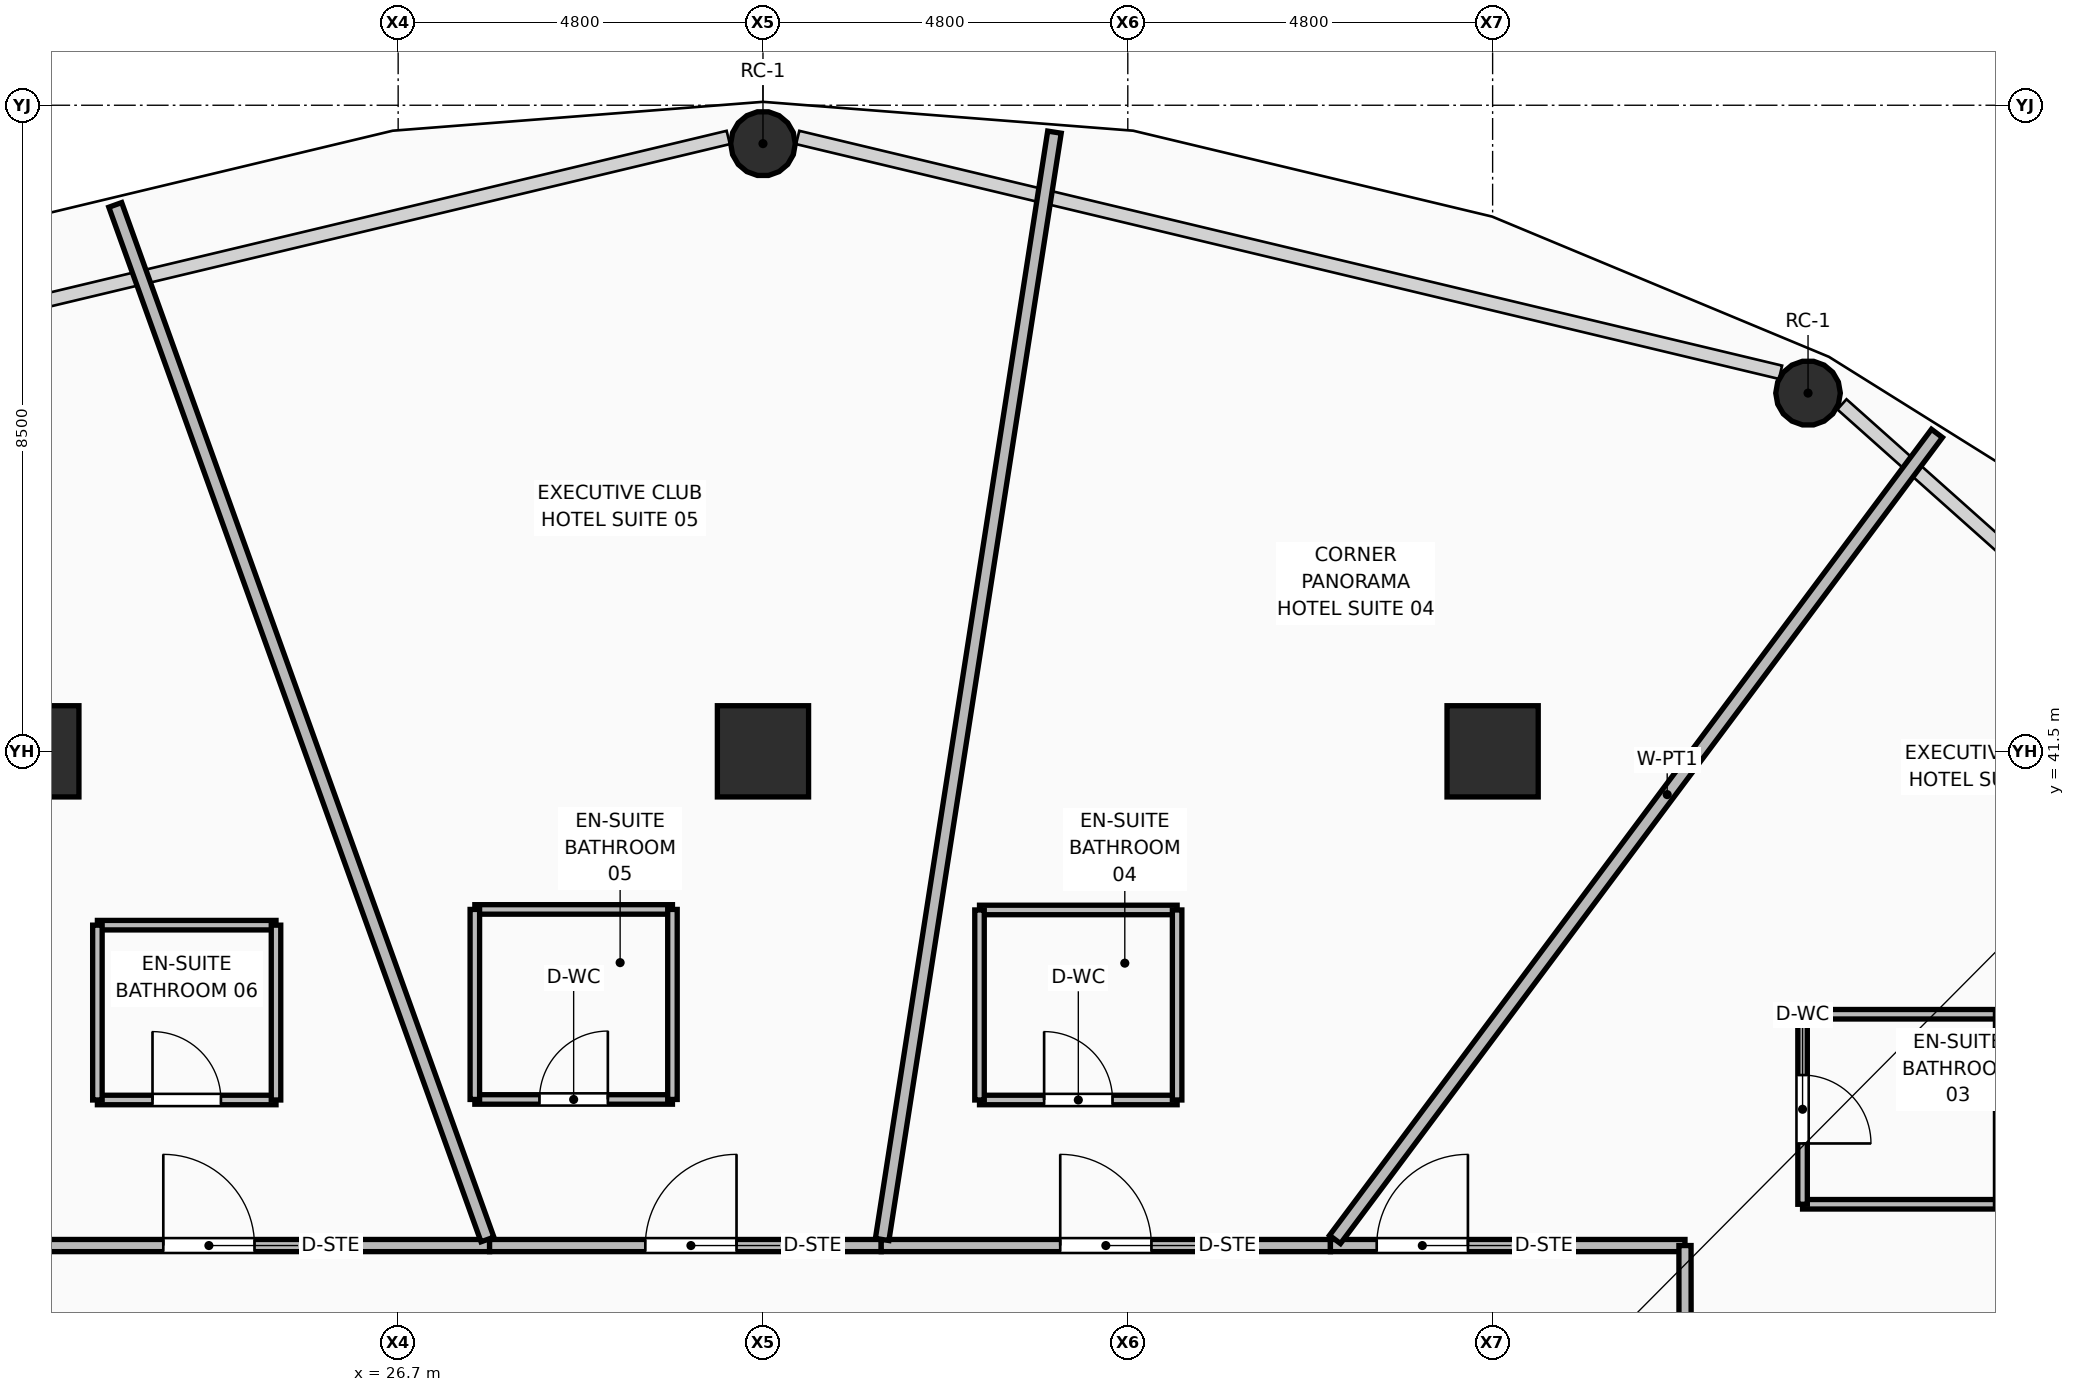
"""IFC4 building model, lengths in metres.
Left out: names, types, materials, properties, quantities, classifications, styles, units other than length and angle.
Written with IfcOpenShell. Run it as: python <this file> out.ifc"""

import sys

from ifc_helpers import new_model, si_unit, direction, frame, frame_2d, origin, origin_2d, place, context, subcontext, project, spatial, rectangle, hollow_rectangle, hollow_circle, extrude, element, fill, save


model = new_model("IFC4")
c1 = context("Model", 3, precision=1e-05, world=origin(), true_north=direction((0.0, 1.0)))
c2 = subcontext(c1, "Body", "Model", "MODEL_VIEW")
j1 = project(units=[si_unit("LENGTHUNIT", "METRE"), si_unit("PLANEANGLEUNIT", "RADIAN")], contexts=[c1])
p1 = place(None, origin())
s1 = spatial("IfcSite", under=j1, at=p1, CompositionType="ELEMENT")
p2 = place(p1, origin())
s2 = spatial("IfcBuilding", under=s1, at=p2, CompositionType="ELEMENT")
p3 = place(p2, frame((0.0, 0.0, 83.25)))
s3 = spatial("IfcBuildingStorey", under=s2, at=p3, CompositionType="ELEMENT", Elevation=83.25)
for number, where, z_axis, x_axis in (
    (1, (21.9, 41.5, 0.0), (0.0, 0.0, 1.0), (1.0, 0.0, 0.0)),
    (2, (31.5, 41.5, 0.0), (0.0, 0.0, 1.0), (1.0, 0.0, 0.0)),
    (3, (41.1, 41.5, 0.0), (0.0, 0.0, 1.0), (1.0, 0.0, 0.0)),
):
    element("IfcColumn", number, at=place(p3, frame(where, z_axis=z_axis, x_axis=x_axis)), inside=s3, PredefinedType="COLUMN", context=c2, shape_type="SweptSolid", body=[
        extrude(hollow_rectangle(XDim=1.2, YDim=1.2, WallThickness=0.045, at=origin_2d()), origin(), (0.0, 0.0, 1.0), 3.75),
    ])
for number, where, z_axis, x_axis in (
    (4, (45.25, 46.213, 0.0), (0.0, 0.0, 1.0), (1.0, 0.0, 0.0)),
    (5, (31.5, 49.495, 0.0), (0.0, 0.0, 1.0), (1.0, 0.0, 0.0)),
):
    element("IfcColumn", number, at=place(p3, frame(where, z_axis=z_axis, x_axis=x_axis)), inside=s3, PredefinedType="COLUMN", context=c2, shape_type="SweptSolid", body=[
        extrude(hollow_circle(Radius=0.425, WallThickness=0.04, at=origin_2d()), origin(), (0.0, 0.0, 1.0), 3.57),
    ])
p4 = place(p3, frame((20.811, 34.998, 0.0), z_axis=(0.0, 0.0, 1.0), x_axis=(1.0, 0.0, 0.0)))
e6 = element("IfcWall", 6, at=p4, inside=s3, PredefinedType="PARTITIONING", context=c2, shape_type="SweptSolid", body=[
    extrude(rectangle(XDim=7.092, YDim=0.16, at=frame_2d((3.546, 0.0))), origin(), (0.0, 0.0, 1.0), 2.928),
])
p5 = place(p4, frame((2.799, 0.0, 0.0)))
e7 = element("IfcOpeningElement", 7, at=p5, cuts=e6, PredefinedType="OPENING", context=c2, shape_type="SweptSolid", body=[
    extrude(rectangle(XDim=1.2, YDim=2.1, at=frame_2d((0.6, 1.05))), frame((0.0, 0.09, 0.0), z_axis=(0.0, -1.0, 0.0), x_axis=(1.0, 0.0, 0.0)), (0.0, 0.0, 1.0), 0.18),
])
p6 = place(p3, frame((27.903, 34.998, 0.0), z_axis=(0.0, 0.0, 1.0), x_axis=(1.0, 0.0, 0.0)))
e8 = element("IfcWall", 8, at=p6, inside=s3, PredefinedType="PARTITIONING", context=c2, shape_type="SweptSolid", body=[
    extrude(rectangle(XDim=5.153, YDim=0.16, at=frame_2d((2.576, 0.0))), origin(), (0.0, 0.0, 1.0), 2.928),
])
p7 = place(p6, frame((2.049, 0.0, 0.0)))
e9 = element("IfcOpeningElement", 9, at=p7, cuts=e8, PredefinedType="OPENING", context=c2, shape_type="SweptSolid", body=[
    extrude(rectangle(XDim=1.2, YDim=2.1, at=frame_2d((0.6, 1.05))), frame((0.0, 0.09, 0.0), z_axis=(0.0, -1.0, 0.0), x_axis=(1.0, 0.0, 0.0)), (0.0, 0.0, 1.0), 0.18),
])
p8 = place(p3, frame((33.056, 34.998, 0.0), z_axis=(0.0, 0.0, 1.0), x_axis=(1.0, 0.0, 0.0)))
e10 = element("IfcWall", 10, at=p8, inside=s3, PredefinedType="PARTITIONING", context=c2, shape_type="SweptSolid", body=[
    extrude(rectangle(XDim=5.91, YDim=0.16, at=frame_2d((2.955, 0.0))), origin(), (0.0, 0.0, 1.0), 3.55),
])
p9 = place(p8, frame((2.355, 0.0, 0.0)))
e11 = element("IfcOpeningElement", 11, at=p9, cuts=e10, PredefinedType="OPENING", context=c2, shape_type="SweptSolid", body=[
    extrude(rectangle(XDim=1.2, YDim=2.1, at=frame_2d((0.6, 1.05))), frame((0.0, 0.09, 0.0), z_axis=(0.0, -1.0, 0.0), x_axis=(1.0, 0.0, 0.0)), (0.0, 0.0, 1.0), 0.18),
])
p10 = place(p3, frame((38.966, 34.998, 0.0), z_axis=(0.0, 0.0, 1.0), x_axis=(1.0, 0.0, 0.0)))
e12 = element("IfcWall", 12, at=p10, inside=s3, PredefinedType="PARTITIONING", context=c2, shape_type="SweptSolid", body=[
    extrude(rectangle(XDim=4.665, YDim=0.16, at=frame_2d((2.333, 0.0))), origin(), (0.0, 0.0, 1.0), 2.928),
])
p11 = place(p10, frame((0.609, 0.0, 0.0)))
e13 = element("IfcOpeningElement", 13, at=p11, cuts=e12, PredefinedType="OPENING", context=c2, shape_type="SweptSolid", body=[
    extrude(rectangle(XDim=1.2, YDim=2.1, at=frame_2d((0.6, 1.05))), frame((0.0, 0.09, 0.0), z_axis=(0.0, -1.0, 0.0), x_axis=(1.0, 0.0, 0.0)), (0.0, 0.0, 1.0), 0.18),
])
p12 = place(p3, frame((43.631, 34.998, 0.0), z_axis=(0.0, 0.0, 1.0), x_axis=(0.000858368782, -0.999999631601, 0.0)))
e14 = element("IfcWall", 14, at=p12, inside=s3, PredefinedType="PARTITIONING", context=c2, shape_type="SweptSolid", body=[
    extrude(rectangle(XDim=3.413, YDim=0.16, at=frame_2d((1.707, 0.0))), origin(), (0.0, 0.0, 1.0), 2.928),
])
p13 = place(p3, frame((43.728, 31.636, 0.0), z_axis=(0.0, 0.0, 1.0), x_axis=(0.878890179317, 0.477024163643, 0.0)))
e15 = element("IfcWall", 15, at=p13, inside=s3, PredefinedType="PARTITIONING", context=c2, shape_type="SweptSolid", body=[
    extrude(rectangle(XDim=13.211, YDim=0.18, at=frame_2d((6.605, 0.0))), origin(), (0.0, 0.0, 1.0), 2.775),
])
p14 = place(p3, frame((39.026, 35.078, 0.0), z_axis=(0.0, 0.0, 1.0), x_axis=(0.598366758348, 0.801222330258, 0.0)))
e16 = element("IfcWall", 16, at=p14, inside=s3, PredefinedType="PARTITIONING", context=c2, shape_type="SweptSolid", body=[
    extrude(rectangle(XDim=13.236, YDim=0.18, at=frame_2d((6.618, 0.0))), origin(), (0.0, 0.0, 1.0), 2.775),
])
p15 = place(p3, frame((33.068, 35.078, 0.0), z_axis=(0.0, 0.0, 1.0), x_axis=(0.153752995268, 0.988109314016, 0.0)))
e17 = element("IfcWall", 17, at=p15, inside=s3, PredefinedType="PARTITIONING", context=c2, shape_type="SweptSolid", body=[
    extrude(rectangle(XDim=14.743, YDim=0.18, at=frame_2d((7.372, 0.0))), origin(), (0.0, 0.0, 1.0), 2.775),
])
p16 = place(p3, frame((27.875, 35.078, 0.0), z_axis=(0.0, 0.0, 1.0), x_axis=(-0.338534786173, 0.940953876952, 0.0)))
e18 = element("IfcWall", 18, at=p16, inside=s3, PredefinedType="PARTITIONING", context=c2, shape_type="SweptSolid", body=[
    extrude(rectangle(XDim=14.465, YDim=0.18, at=frame_2d((7.232, 0.0))), origin(), (0.0, 0.0, 1.0), 2.775),
])
for number, where, z_axis, x_axis in (
    (19, (45.178, 35.541, 0.0), (0.0, 0.0, 1.0), (1.0, 0.0, 0.0)),
    (20, (45.178, 38.041, 0.0), (0.0, 0.0, 1.0), (1.0, 0.0, 0.0)),
):
    element("IfcWall", number, at=place(p3, frame(where, z_axis=z_axis, x_axis=x_axis)), inside=s3, PredefinedType="PARTITIONING", context=c2, shape_type="SweptSolid", body=[
        extrude(rectangle(XDim=2.6, YDim=0.125, at=frame_2d((1.3, 0.0))), origin(), (0.0, 0.0, 1.0), 3.55),
    ])
p17 = place(p3, frame((45.178, 35.541, 0.0), z_axis=(0.0, 0.0, 1.0), x_axis=(0.0, 1.0, 0.0)))
e21 = element("IfcWall", 21, at=p17, inside=s3, PredefinedType="PARTITIONING", context=c2, shape_type="SweptSolid", body=[
    extrude(rectangle(XDim=2.5, YDim=0.125, at=frame_2d((1.25, 0.0))), origin(), (0.0, 0.0, 1.0), 3.55),
])
p18 = place(p17, frame((0.8, 0.0, 0.0)))
e22 = element("IfcOpeningElement", 22, at=p18, cuts=e21, PredefinedType="OPENING", context=c2, shape_type="SweptSolid", body=[
    extrude(rectangle(XDim=0.9, YDim=2.1, at=frame_2d((0.45, 1.05))), frame((0.0, 0.073, 0.0), z_axis=(0.0, -1.0, 0.0), x_axis=(1.0, 0.0, 0.0)), (0.0, 0.0, 1.0), 0.145),
])
p19 = place(p3, frame((47.778, 35.541, 0.0), z_axis=(0.0, 0.0, 1.0), x_axis=(0.0, 1.0, 0.0)))
e23 = element("IfcWall", 23, at=p19, inside=s3, PredefinedType="PARTITIONING", context=c2, shape_type="SweptSolid", body=[
    extrude(rectangle(XDim=2.5, YDim=0.125, at=frame_2d((1.25, 0.0))), origin(), (0.0, 0.0, 1.0), 3.55),
])
p20 = place(p3, frame((34.349, 36.913, 0.0), z_axis=(0.0, 0.0, 1.0), x_axis=(1.0, 0.0, 0.0)))
e24 = element("IfcWall", 24, at=p20, inside=s3, PredefinedType="PARTITIONING", context=c2, shape_type="SweptSolid", body=[
    extrude(rectangle(XDim=2.6, YDim=0.125, at=frame_2d((1.3, 0.0))), origin(), (0.0, 0.0, 1.0), 3.55),
])
p21 = place(p20, frame((0.85, 0.0, 0.0)))
e25 = element("IfcOpeningElement", 25, at=p21, cuts=e24, PredefinedType="OPENING", context=c2, shape_type="SweptSolid", body=[
    extrude(rectangle(XDim=0.9, YDim=2.1, at=frame_2d((0.45, 1.05))), frame((0.0, 0.073, 0.0), z_axis=(0.0, -1.0, 0.0), x_axis=(1.0, 0.0, 0.0)), (0.0, 0.0, 1.0), 0.145),
])
p22 = place(p3, frame((34.349, 39.413, 0.0), z_axis=(0.0, 0.0, 1.0), x_axis=(1.0, 0.0, 0.0)))
e26 = element("IfcWall", 26, at=p22, inside=s3, PredefinedType="PARTITIONING", context=c2, shape_type="SweptSolid", body=[
    extrude(rectangle(XDim=2.6, YDim=0.125, at=frame_2d((1.3, 0.0))), origin(), (0.0, 0.0, 1.0), 3.55),
])
for number, where, z_axis, x_axis in (
    (27, (34.349, 36.913, 0.0), (0.0, 0.0, 1.0), (0.0, 1.0, 0.0)),
    (28, (36.949, 36.913, 0.0), (0.0, 0.0, 1.0), (0.0, 1.0, 0.0)),
):
    element("IfcWall", number, at=place(p3, frame(where, z_axis=z_axis, x_axis=x_axis)), inside=s3, PredefinedType="PARTITIONING", context=c2, shape_type="SweptSolid", body=[
        extrude(rectangle(XDim=2.5, YDim=0.125, at=frame_2d((1.25, 0.0))), origin(), (0.0, 0.0, 1.0), 3.55),
    ])
p23 = place(p3, frame((27.709, 36.92, 0.0), z_axis=(0.0, 0.0, 1.0), x_axis=(1.0, 0.0, 0.0)))
e29 = element("IfcWall", 29, at=p23, inside=s3, PredefinedType="PARTITIONING", context=c2, shape_type="SweptSolid", body=[
    extrude(rectangle(XDim=2.6, YDim=0.125, at=frame_2d((1.3, 0.0))), origin(), (0.0, 0.0, 1.0), 3.55),
])
p24 = place(p23, frame((0.85, 0.0, 0.0)))
e30 = element("IfcOpeningElement", 30, at=p24, cuts=e29, PredefinedType="OPENING", context=c2, shape_type="SweptSolid", body=[
    extrude(rectangle(XDim=0.9, YDim=2.1, at=frame_2d((0.45, 1.05))), frame((0.0, 0.073, 0.0), z_axis=(0.0, -1.0, 0.0), x_axis=(1.0, 0.0, 0.0)), (0.0, 0.0, 1.0), 0.145),
])
p25 = place(p3, frame((27.709, 39.42, 0.0), z_axis=(0.0, 0.0, 1.0), x_axis=(1.0, 0.0, 0.0)))
e31 = element("IfcWall", 31, at=p25, inside=s3, PredefinedType="PARTITIONING", context=c2, shape_type="SweptSolid", body=[
    extrude(rectangle(XDim=2.6, YDim=0.125, at=frame_2d((1.3, 0.0))), origin(), (0.0, 0.0, 1.0), 3.55),
])
for number, where, z_axis, x_axis in (
    (32, (27.709, 36.92, 0.0), (0.0, 0.0, 1.0), (0.0, 1.0, 0.0)),
    (33, (30.309, 36.92, 0.0), (0.0, 0.0, 1.0), (0.0, 1.0, 0.0)),
):
    element("IfcWall", number, at=place(p3, frame(where, z_axis=z_axis, x_axis=x_axis)), inside=s3, PredefinedType="PARTITIONING", context=c2, shape_type="SweptSolid", body=[
        extrude(rectangle(XDim=2.5, YDim=0.125, at=frame_2d((1.25, 0.0))), origin(), (0.0, 0.0, 1.0), 3.55),
    ])
p26 = place(p3, frame((22.743, 36.913, 0.0), z_axis=(0.0, 0.0, 1.0), x_axis=(1.0, 0.0, 0.0)))
e34 = element("IfcWall", 34, at=p26, inside=s3, PredefinedType="PARTITIONING", context=c2, shape_type="SweptSolid", body=[
    extrude(rectangle(XDim=2.35, YDim=0.125, at=frame_2d((1.175, 0.0))), origin(), (0.0, 0.0, 1.0), 3.55),
])
p27 = place(p26, frame((0.725, 0.0, 0.0)))
e35 = element("IfcOpeningElement", 35, at=p27, cuts=e34, PredefinedType="OPENING", context=c2, shape_type="SweptSolid", body=[
    extrude(rectangle(XDim=0.9, YDim=2.1, at=frame_2d((0.45, 1.05))), frame((0.0, 0.073, 0.0), z_axis=(0.0, -1.0, 0.0), x_axis=(1.0, 0.0, 0.0)), (0.0, 0.0, 1.0), 0.145),
])
p28 = place(p3, frame((22.743, 39.213, 0.0), z_axis=(0.0, 0.0, 1.0), x_axis=(1.0, 0.0, 0.0)))
e36 = element("IfcWall", 36, at=p28, inside=s3, PredefinedType="PARTITIONING", context=c2, shape_type="SweptSolid", body=[
    extrude(rectangle(XDim=2.35, YDim=0.125, at=frame_2d((1.175, 0.0))), origin(), (0.0, 0.0, 1.0), 3.55),
])
for number, where, z_axis, x_axis in (
    (37, (22.743, 36.913, 0.0), (0.0, 0.0, 1.0), (0.0, 1.0, 0.0)),
    (38, (25.093, 36.913, 0.0), (0.0, 0.0, 1.0), (0.0, 1.0, 0.0)),
):
    element("IfcWall", number, at=place(p3, frame(where, z_axis=z_axis, x_axis=x_axis)), inside=s3, PredefinedType="PARTITIONING", context=c2, shape_type="SweptSolid", body=[
        extrude(rectangle(XDim=2.3, YDim=0.125, at=frame_2d((1.15, 0.0))), origin(), (0.0, 0.0, 1.0), 3.55),
    ])
p29 = place(p18, frame((0.9, 0.0, 0.0), z_axis=(0.0, 0.0, 1.0), x_axis=(-1.0, 0.0, 0.0)))
e39 = element("IfcDoor", 39, at=p29, inside=s3, OperationType="SINGLE_SWING_RIGHT", PredefinedType="DOOR", context=c2, shape_type="SweptSolid", body=[
    extrude(rectangle(XDim=0.9, YDim=2.1, at=frame_2d((0.45, 1.05))), frame((0.0, 0.025, 0.0), z_axis=(0.0, -1.0, 0.0), x_axis=(1.0, 0.0, 0.0)), (0.0, 0.0, 1.0), 0.05),
])
fill(e22, e39)
p30 = place(p11, origin())
e40 = element("IfcDoor", 40, at=p30, inside=s3, OperationType="SINGLE_SWING_RIGHT", PredefinedType="DOOR", context=c2, shape_type="SweptSolid", body=[
    extrude(rectangle(XDim=1.2, YDim=2.1, at=frame_2d((0.6, 1.05))), frame((0.0, 0.025, 0.0), z_axis=(0.0, -1.0, 0.0), x_axis=(1.0, 0.0, 0.0)), (0.0, 0.0, 1.0), 0.05),
])
fill(e13, e40)
p31 = place(p21, origin())
e41 = element("IfcDoor", 41, at=p31, inside=s3, OperationType="SINGLE_SWING_LEFT", PredefinedType="DOOR", context=c2, shape_type="SweptSolid", body=[
    extrude(rectangle(XDim=0.9, YDim=2.1, at=frame_2d((0.45, 1.05))), frame((0.0, 0.025, 0.0), z_axis=(0.0, -1.0, 0.0), x_axis=(1.0, 0.0, 0.0)), (0.0, 0.0, 1.0), 0.05),
])
fill(e25, e41)
p32 = place(p9, origin())
e42 = element("IfcDoor", 42, at=p32, inside=s3, OperationType="SINGLE_SWING_LEFT", PredefinedType="DOOR", context=c2, shape_type="SweptSolid", body=[
    extrude(rectangle(XDim=1.2, YDim=2.1, at=frame_2d((0.6, 1.05))), frame((0.0, 0.025, 0.0), z_axis=(0.0, -1.0, 0.0), x_axis=(1.0, 0.0, 0.0)), (0.0, 0.0, 1.0), 0.05),
])
fill(e11, e42)
p33 = place(p24, origin())
e43 = element("IfcDoor", 43, at=p33, inside=s3, OperationType="SINGLE_SWING_RIGHT", PredefinedType="DOOR", context=c2, shape_type="SweptSolid", body=[
    extrude(rectangle(XDim=0.9, YDim=2.1, at=frame_2d((0.45, 1.05))), frame((0.0, 0.025, 0.0), z_axis=(0.0, -1.0, 0.0), x_axis=(1.0, 0.0, 0.0)), (0.0, 0.0, 1.0), 0.05),
])
fill(e30, e43)
p34 = place(p7, origin())
e44 = element("IfcDoor", 44, at=p34, inside=s3, OperationType="SINGLE_SWING_RIGHT", PredefinedType="DOOR", context=c2, shape_type="SweptSolid", body=[
    extrude(rectangle(XDim=1.2, YDim=2.1, at=frame_2d((0.6, 1.05))), frame((0.0, 0.025, 0.0), z_axis=(0.0, -1.0, 0.0), x_axis=(1.0, 0.0, 0.0)), (0.0, 0.0, 1.0), 0.05),
])
fill(e9, e44)
p35 = place(p27, origin())
e45 = element("IfcDoor", 45, at=p35, inside=s3, OperationType="SINGLE_SWING_LEFT", PredefinedType="DOOR", context=c2, shape_type="SweptSolid", body=[
    extrude(rectangle(XDim=0.9, YDim=2.1, at=frame_2d((0.45, 1.05))), frame((0.0, 0.025, 0.0), z_axis=(0.0, -1.0, 0.0), x_axis=(1.0, 0.0, 0.0)), (0.0, 0.0, 1.0), 0.05),
])
fill(e35, e45)
p36 = place(p5, origin())
e46 = element("IfcDoor", 46, at=p36, inside=s3, OperationType="SINGLE_SWING_LEFT", PredefinedType="DOOR", context=c2, shape_type="SweptSolid", body=[
    extrude(rectangle(XDim=1.2, YDim=2.1, at=frame_2d((0.6, 1.05))), frame((0.0, 0.025, 0.0), z_axis=(0.0, -1.0, 0.0), x_axis=(1.0, 0.0, 0.0)), (0.0, 0.0, 1.0), 0.05),
])
fill(e7, e46)
save(model, sys.argv[1])
